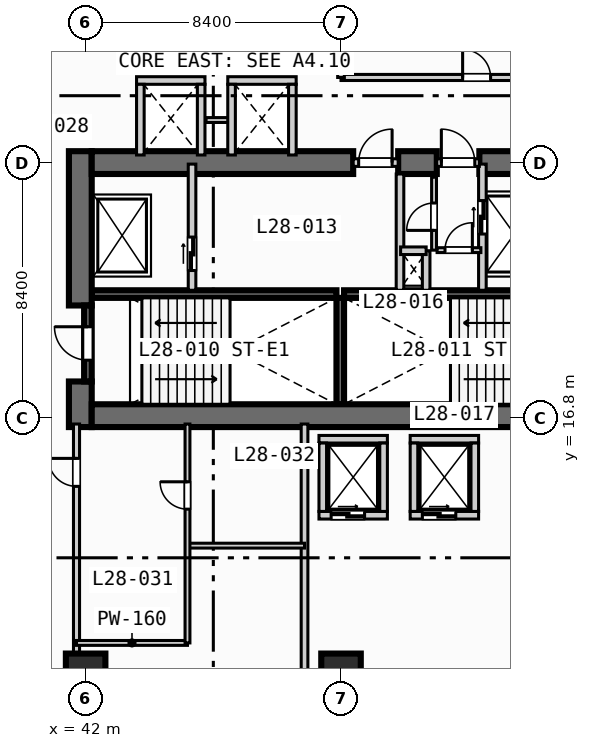
"""IFC4 building model, lengths in metres.
Left out: names, types, materials, properties, quantities, classifications, styles, units other than length and angle.
Written with IfcOpenShell. Run it as: python <this file> out.ifc"""

import sys

from ifc_helpers import new_model, si_unit, direction, frame, frame_2d, origin, origin_2d, place, context, subcontext, project, spatial, rectangle, extrude, element, fill, save


model = new_model("IFC4")
c1 = context("Model", 3, precision=1e-05, world=origin(), true_north=direction((0.0, 1.0)))
c2 = subcontext(c1, "Body", "Model", "MODEL_VIEW")
j1 = project(units=[si_unit("LENGTHUNIT", "METRE"), si_unit("PLANEANGLEUNIT", "RADIAN")], contexts=[c1])
p1 = place(None, origin())
s1 = spatial("IfcSite", under=j1, at=p1, CompositionType="ELEMENT")
p2 = place(p1, origin())
s2 = spatial("IfcBuilding", under=s1, at=p2, CompositionType="ELEMENT")
p3 = place(p2, frame((0.0, 0.0, 119.0)))
s3 = spatial("IfcBuildingStorey", under=s2, at=p3, CompositionType="ELEMENT", Elevation=119.0)
for number, where, z_axis, x_axis in (
    (1, (42.2, 20.875, 0.0), (0.0, 0.0, 1.0), (1.0, 0.0, 0.0)),
    (2, (50.5, 20.875, 0.0), (0.0, 0.0, 1.0), (1.0, 0.0, 0.0)),
):
    element("IfcWall", number, at=place(p3, frame(where, z_axis=z_axis, x_axis=x_axis)), inside=s3, PredefinedType="SOLIDWALL", context=c2, shape_type="SweptSolid", body=[
        extrude(rectangle(XDim=8.05, YDim=0.25, at=frame_2d((4.025, 0.0))), origin(), (0.0, 0.0, 1.0), 3.55),
    ])
p4 = place(p3, frame((50.375, 17.25, 0.0), z_axis=(0.0, 0.0, 1.0), x_axis=(0.0, 1.0, 0.0)))
e3 = element("IfcWall", 3, at=p4, inside=s3, PredefinedType="SOLIDWALL", context=c2, shape_type="SweptSolid", body=[
    extrude(rectangle(XDim=3.5, YDim=0.25, at=frame_2d((1.75, 0.0))), origin(), (0.0, 0.0, 1.0), 3.55),
])
p5 = place(p3, frame((41.825, 16.5, 0.0), z_axis=(0.0, 0.0, 1.0), x_axis=(0.0, 1.0, 0.0)))
e4 = element("IfcWall", 4, at=p5, inside=s3, PredefinedType="SHEAR", context=c2, shape_type="SweptSolid", body=[
    extrude(rectangle(XDim=1.5, YDim=0.75, at=frame_2d((0.75, 0.0))), origin(), (0.0, 0.0, 1.0), 3.55),
])
p6 = place(p3, frame((41.825, 20.5, 0.0), z_axis=(0.0, 0.0, 1.0), x_axis=(0.0, 1.0, 0.0)))
e5 = element("IfcWall", 5, at=p6, inside=s3, PredefinedType="SHEAR", context=c2, shape_type="SweptSolid", body=[
    extrude(rectangle(XDim=5.075, YDim=0.75, at=frame_2d((2.538, 0.0))), origin(), (0.0, 0.0, 1.0), 3.55),
])
p7 = place(p3, frame((42.2, 16.875, 0.0), z_axis=(0.0, 0.0, 1.0), x_axis=(1.0, 0.0, 0.0)))
e6 = element("IfcWall", 6, at=p7, inside=s3, PredefinedType="SHEAR", context=c2, shape_type="SweptSolid", body=[
    extrude(rectangle(XDim=16.35, YDim=0.75, at=frame_2d((8.175, 0.0))), origin(), (0.0, 0.0, 1.0), 3.55),
])
p8 = place(p3, frame((42.2, 25.2, 0.0), z_axis=(0.0, 0.0, 1.0), x_axis=(1.0, 0.0, 0.0)))
e7 = element("IfcWall", 7, at=p8, inside=s3, PredefinedType="SHEAR", context=c2, shape_type="SweptSolid", body=[
    extrude(rectangle(XDim=8.6, YDim=0.75, at=frame_2d((4.3, 0.0))), origin(), (0.0, 0.0, 1.0), 3.55),
])
p9 = place(p3, frame((52.28, 25.2, 0.0), z_axis=(0.0, 0.0, 1.0), x_axis=(1.0, 0.0, 0.0)))
e8 = element("IfcWall", 8, at=p9, inside=s3, PredefinedType="SHEAR", context=c2, shape_type="SweptSolid", body=[
    extrude(rectangle(XDim=1.27, YDim=0.75, at=frame_2d((0.635, 0.0))), origin(), (0.0, 0.0, 1.0), 3.55),
])
p10 = place(p3, frame((54.95, 25.2, 0.0), z_axis=(0.0, 0.0, 1.0), x_axis=(1.0, 0.0, 0.0)))
e9 = element("IfcWall", 9, at=p10, inside=s3, PredefinedType="SHEAR", context=c2, shape_type="SweptSolid", body=[
    extrude(rectangle(XDim=3.6, YDim=0.75, at=frame_2d((1.8, 0.0))), origin(), (0.0, 0.0, 1.0), 3.55),
])
for number, where, z_axis, x_axis in (
    (10, (42.0, 8.4, 0.0), (0.0, 0.0, 1.0), (1.0, 0.0, 0.0)),
    (11, (50.4, 8.4, 0.0), (0.0, 0.0, 1.0), (1.0, 0.0, 0.0)),
):
    element("IfcColumn", number, at=place(p3, frame(where, z_axis=z_axis, x_axis=x_axis)), inside=s3, PredefinedType="COLUMN", context=c2, shape_type="SweptSolid", body=[
        extrude(rectangle(XDim=1.3, YDim=1.3, at=origin_2d()), origin(), (0.0, 0.0, 1.0), 3.8),
    ])
p11 = place(p3, frame((42.075, 18.0, 0.0), z_axis=(0.0, 0.0, 1.0), x_axis=(0.0, 1.0, 0.0)))
e12 = element("IfcWall", 12, at=p11, inside=s3, PredefinedType="SOLIDWALL", context=c2, shape_type="SweptSolid", body=[
    extrude(rectangle(XDim=2.5, YDim=0.25, at=frame_2d((1.25, 0.0))), origin(), (0.0, 0.0, 1.0), 3.55),
])
p12 = place(p11, frame((0.7, 0.0, 0.0)))
e13 = element("IfcOpeningElement", 13, at=p12, cuts=e12, PredefinedType="OPENING", context=c2, shape_type="SweptSolid", body=[
    extrude(rectangle(XDim=1.1, YDim=2.15, at=frame_2d((0.55, 1.075))), frame((0.0, 0.135, 0.0), z_axis=(0.0, -1.0, 0.0), x_axis=(1.0, 0.0, 0.0)), (0.0, 0.0, 1.0), 0.27),
])
p13 = place(p3, frame((45.5, 21.0, 0.0), z_axis=(0.0, 0.0, 1.0), x_axis=(0.0, 1.0, 0.0)))
e14 = element("IfcWall", 14, at=p13, inside=s3, PredefinedType="SOLIDWALL", context=c2, shape_type="SweptSolid", body=[
    extrude(rectangle(XDim=4.15, YDim=0.25, at=frame_2d((2.075, 0.0))), origin(), (0.0, 0.0, 1.0), 3.55),
])
p14 = place(p13, frame((0.65, 0.0, 0.0)))
e15 = element("IfcOpeningElement", 15, at=p14, cuts=e14, PredefinedType="OPENING", context=c2, shape_type="SweptSolid", body=[
    extrude(rectangle(XDim=1.1, YDim=2.15, at=frame_2d((0.55, 1.075))), frame((0.0, 0.135, 0.0), z_axis=(0.0, -1.0, 0.0), x_axis=(1.0, 0.0, 0.0)), (0.0, 0.0, 1.0), 0.27),
])
p15 = place(p3, frame((50.8, 25.2, 0.0), z_axis=(0.0, 0.0, 1.0), x_axis=(1.0, 0.0, 0.0)))
e16 = element("IfcWall", 16, at=p15, inside=s3, PredefinedType="SOLIDWALL", context=c2, shape_type="SweptSolid", body=[
    extrude(rectangle(XDim=1.48, YDim=0.25, at=frame_2d((0.74, 0.0))), origin(), (0.0, 0.0, 1.0), 3.55),
])
p16 = place(p15, frame((0.18, 0.0, 0.0)))
e17 = element("IfcOpeningElement", 17, at=p16, cuts=e16, PredefinedType="OPENING", context=c2, shape_type="SweptSolid", body=[
    extrude(rectangle(XDim=1.1, YDim=2.15, at=frame_2d((0.55, 1.075))), frame((0.0, 0.135, 0.0), z_axis=(0.0, -1.0, 0.0), x_axis=(1.0, 0.0, 0.0)), (0.0, 0.0, 1.0), 0.27),
])
p17 = place(p3, frame((52.34, 21.0, 0.0), z_axis=(0.0, 0.0, 1.0), x_axis=(0.0, 1.0, 0.0)))
e18 = element("IfcWall", 18, at=p17, inside=s3, PredefinedType="SOLIDWALL", context=c2, shape_type="SweptSolid", body=[
    extrude(rectangle(XDim=3.825, YDim=0.25, at=frame_2d((1.913, 0.0))), origin(), (0.0, 0.0, 1.0), 3.55),
])
p18 = place(p3, frame((55.05, 21.0, 0.0), z_axis=(0.0, 0.0, 1.0), x_axis=(0.0, 1.0, 0.0)))
e19 = element("IfcWall", 19, at=p18, inside=s3, PredefinedType="SOLIDWALL", context=c2, shape_type="SweptSolid", body=[
    extrude(rectangle(XDim=4.15, YDim=0.25, at=frame_2d((2.075, 0.0))), origin(), (0.0, 0.0, 1.0), 3.55),
])
p19 = place(p18, frame((1.85, 0.0, 0.0)))
e20 = element("IfcOpeningElement", 20, at=p19, cuts=e19, PredefinedType="OPENING", context=c2, shape_type="SweptSolid", body=[
    extrude(rectangle(XDim=1.1, YDim=2.15, at=frame_2d((0.55, 1.075))), frame((0.0, 0.135, 0.0), z_axis=(0.0, -1.0, 0.0), x_axis=(1.0, 0.0, 0.0)), (0.0, 0.0, 1.0), 0.27),
])
p20 = place(p3, frame((53.55, 25.2, 0.0), z_axis=(0.0, 0.0, 1.0), x_axis=(1.0, 0.0, 0.0)))
e21 = element("IfcWall", 21, at=p20, inside=s3, PredefinedType="SOLIDWALL", context=c2, shape_type="SweptSolid", body=[
    extrude(rectangle(XDim=1.4, YDim=0.25, at=frame_2d((0.7, 0.0))), origin(), (0.0, 0.0, 1.0), 3.55),
])
p21 = place(p20, frame((0.15, 0.0, 0.0)))
e22 = element("IfcOpeningElement", 22, at=p21, cuts=e21, PredefinedType="OPENING", context=c2, shape_type="SweptSolid", body=[
    extrude(rectangle(XDim=1.1, YDim=2.15, at=frame_2d((0.55, 1.075))), frame((0.0, 0.135, 0.0), z_axis=(0.0, -1.0, 0.0), x_axis=(1.0, 0.0, 0.0)), (0.0, 0.0, 1.0), 0.27),
])
p22 = place(p3, frame((53.2, 21.0, 0.0), z_axis=(0.0, 0.0, 1.0), x_axis=(0.0, 1.0, 0.0)))
e23 = element("IfcWall", 23, at=p22, inside=s3, PredefinedType="SOLIDWALL", context=c2, shape_type="SweptSolid", body=[
    extrude(rectangle(XDim=1.3, YDim=0.25, at=frame_2d((0.65, 0.0))), origin(), (0.0, 0.0, 1.0), 3.55),
])
p23 = place(p3, frame((52.36, 22.3, 0.0), z_axis=(0.0, 0.0, 1.0), x_axis=(1.0, 0.0, 0.0)))
e24 = element("IfcWall", 24, at=p23, inside=s3, PredefinedType="SOLIDWALL", context=c2, shape_type="SweptSolid", body=[
    extrude(rectangle(XDim=0.84, YDim=0.25, at=frame_2d((0.42, 0.0))), origin(), (0.0, 0.0, 1.0), 3.55),
])
p24 = place(p3, frame((53.56, 22.32, 0.0), z_axis=(0.0, 0.0, 1.0), x_axis=(1.0, 0.0, 0.0)))
e25 = element("IfcWall", 25, at=p24, inside=s3, PredefinedType="PARTITIONING", context=c2, shape_type="SweptSolid", body=[
    extrude(rectangle(XDim=1.44, YDim=0.16, at=frame_2d((0.72, 0.0))), origin(), (0.0, 0.0, 1.0), 3.55),
])
p25 = place(p24, frame((0.26, 0.0, 0.0)))
e26 = element("IfcOpeningElement", 26, at=p25, cuts=e25, PredefinedType="OPENING", context=c2, shape_type="SweptSolid", body=[
    extrude(rectangle(XDim=0.9, YDim=2.1, at=frame_2d((0.45, 1.05))), frame((0.0, 0.09, 0.0), z_axis=(0.0, -1.0, 0.0), x_axis=(1.0, 0.0, 0.0)), (0.0, 0.0, 1.0), 0.18),
])
p26 = place(p3, frame((53.46, 22.32, 0.0), z_axis=(0.0, 0.0, 1.0), x_axis=(0.0, 1.0, 0.0)))
e27 = element("IfcWall", 27, at=p26, inside=s3, PredefinedType="PARTITIONING", context=c2, shape_type="SweptSolid", body=[
    extrude(rectangle(XDim=2.4, YDim=0.16, at=frame_2d((1.2, 0.0))), origin(), (0.0, 0.0, 1.0), 3.55),
])
p27 = place(p26, frame((0.65, 0.0, 0.0)))
e28 = element("IfcOpeningElement", 28, at=p27, cuts=e27, PredefinedType="OPENING", context=c2, shape_type="SweptSolid", body=[
    extrude(rectangle(XDim=0.9, YDim=2.1, at=frame_2d((0.45, 1.05))), frame((0.0, 0.09, 0.0), z_axis=(0.0, -1.0, 0.0), x_axis=(1.0, 0.0, 0.0)), (0.0, 0.0, 1.0), 0.18),
])
p28 = place(p3, frame((49.675, 13.6, 0.0), z_axis=(0.0, 0.0, 1.0), x_axis=(1.0, 0.0, 0.0)))
e29 = element("IfcWall", 29, at=p28, inside=s3, PredefinedType="SOLIDWALL", context=c2, shape_type="SweptSolid", body=[
    extrude(rectangle(XDim=2.25, YDim=0.25, at=frame_2d((1.125, 0.0))), origin(), (0.0, 0.0, 1.0), 3.55),
])
p29 = place(p28, frame((0.4, 0.0, 0.0)))
e30 = element("IfcOpeningElement", 30, at=p29, cuts=e29, PredefinedType="OPENING", context=c2, shape_type="SweptSolid", body=[
    extrude(rectangle(XDim=1.1, YDim=2.15, at=frame_2d((0.55, 1.075))), frame((0.0, 0.135, 0.0), z_axis=(0.0, -1.0, 0.0), x_axis=(1.0, 0.0, 0.0)), (0.0, 0.0, 1.0), 0.27),
])
for number, where, z_axis, x_axis in (
    (31, (49.675, 16.1, 0.0), (0.0, 0.0, 1.0), (1.0, 0.0, 0.0)),
    (32, (49.8, 13.725, 0.0), (0.0, 0.0, 1.0), (0.0, 1.0, 0.0)),
    (33, (51.8, 13.725, 0.0), (0.0, 0.0, 1.0), (0.0, 1.0, 0.0)),
):
    element("IfcWall", number, at=place(p3, frame(where, z_axis=z_axis, x_axis=x_axis)), inside=s3, PredefinedType="SOLIDWALL", context=c2, shape_type="SweptSolid", body=[
        extrude(rectangle(XDim=2.25, YDim=0.25, at=frame_2d((1.125, 0.0))), origin(), (0.0, 0.0, 1.0), 3.55),
    ])
p30 = place(p3, frame((52.675, 13.6, 0.0), z_axis=(0.0, 0.0, 1.0), x_axis=(1.0, 0.0, 0.0)))
e34 = element("IfcWall", 34, at=p30, inside=s3, PredefinedType="SOLIDWALL", context=c2, shape_type="SweptSolid", body=[
    extrude(rectangle(XDim=2.25, YDim=0.25, at=frame_2d((1.125, 0.0))), origin(), (0.0, 0.0, 1.0), 3.55),
])
p31 = place(p30, frame((0.4, 0.0, 0.0)))
e35 = element("IfcOpeningElement", 35, at=p31, cuts=e34, PredefinedType="OPENING", context=c2, shape_type="SweptSolid", body=[
    extrude(rectangle(XDim=1.1, YDim=2.15, at=frame_2d((0.55, 1.075))), frame((0.0, 0.135, 0.0), z_axis=(0.0, -1.0, 0.0), x_axis=(1.0, 0.0, 0.0)), (0.0, 0.0, 1.0), 0.27),
])
for number, where, z_axis, x_axis in (
    (36, (52.675, 16.1, 0.0), (0.0, 0.0, 1.0), (1.0, 0.0, 0.0)),
    (37, (52.8, 13.725, 0.0), (0.0, 0.0, 1.0), (0.0, 1.0, 0.0)),
    (38, (54.8, 13.725, 0.0), (0.0, 0.0, 1.0), (0.0, 1.0, 0.0)),
    (39, (43.675, 27.9, 0.0), (0.0, 0.0, 1.0), (1.0, 0.0, 0.0)),
):
    element("IfcWall", number, at=place(p3, frame(where, z_axis=z_axis, x_axis=x_axis)), inside=s3, PredefinedType="SOLIDWALL", context=c2, shape_type="SweptSolid", body=[
        extrude(rectangle(XDim=2.25, YDim=0.25, at=frame_2d((1.125, 0.0))), origin(), (0.0, 0.0, 1.0), 3.55),
    ])
for number, where, z_axis, x_axis in (
    (40, (43.8, 25.45, 0.0), (0.0, 0.0, 1.0), (0.0, 1.0, 0.0)),
    (41, (45.8, 25.45, 0.0), (0.0, 0.0, 1.0), (0.0, 1.0, 0.0)),
):
    element("IfcWall", number, at=place(p3, frame(where, z_axis=z_axis, x_axis=x_axis)), inside=s3, PredefinedType="SOLIDWALL", context=c2, shape_type="SweptSolid", body=[
        extrude(rectangle(XDim=2.325, YDim=0.25, at=frame_2d((1.163, 0.0))), origin(), (0.0, 0.0, 1.0), 3.55),
    ])
p32 = place(p3, frame((45.96, 26.6, 0.0), z_axis=(0.0, 0.0, 1.0), x_axis=(1.0, 0.0, 0.0)))
e42 = element("IfcWall", 42, at=p32, inside=s3, PredefinedType="PARTITIONING", context=c2, shape_type="SweptSolid", body=[
    extrude(rectangle(XDim=0.88, YDim=0.16, at=frame_2d((0.44, 0.0))), origin(), (0.0, 0.0, 1.0), 3.55),
])
p33 = place(p3, frame((46.675, 27.9, 0.0), z_axis=(0.0, 0.0, 1.0), x_axis=(1.0, 0.0, 0.0)))
e43 = element("IfcWall", 43, at=p33, inside=s3, PredefinedType="SOLIDWALL", context=c2, shape_type="SweptSolid", body=[
    extrude(rectangle(XDim=2.25, YDim=0.25, at=frame_2d((1.125, 0.0))), origin(), (0.0, 0.0, 1.0), 3.55),
])
for number, where, z_axis, x_axis in (
    (44, (46.8, 25.45, 0.0), (0.0, 0.0, 1.0), (0.0, 1.0, 0.0)),
    (45, (48.8, 25.45, 0.0), (0.0, 0.0, 1.0), (0.0, 1.0, 0.0)),
):
    element("IfcWall", number, at=place(p3, frame(where, z_axis=z_axis, x_axis=x_axis)), inside=s3, PredefinedType="SOLIDWALL", context=c2, shape_type="SweptSolid", body=[
        extrude(rectangle(XDim=2.325, YDim=0.25, at=frame_2d((1.163, 0.0))), origin(), (0.0, 0.0, 1.0), 3.55),
    ])
p34 = place(p3, frame((41.7, 0.35, 0.0), z_axis=(0.0, 0.0, 1.0), x_axis=(0.0, 1.0, 0.0)))
e46 = element("IfcWall", 46, at=p34, inside=s3, PredefinedType="PARTITIONING", context=c2, shape_type="SweptSolid", body=[
    extrude(rectangle(XDim=16.25, YDim=0.2, at=frame_2d((8.125, 0.0))), origin(), (0.0, 0.0, 1.0), 2.8),
])
p35 = place(p34, frame((4.0, 0.0, 0.0)))
e47 = element("IfcOpeningElement", 47, at=p35, cuts=e46, PredefinedType="OPENING", context=c2, shape_type="SweptSolid", body=[
    extrude(rectangle(XDim=0.92, YDim=2.1, at=frame_2d((0.46, 1.05))), frame((0.0, 0.11, 0.0), z_axis=(0.0, -1.0, 0.0), x_axis=(1.0, 0.0, 0.0)), (0.0, 0.0, 1.0), 0.22),
])
p36 = place(p34, frame((14.2, 0.0, 0.0)))
e48 = element("IfcOpeningElement", 48, at=p36, cuts=e46, PredefinedType="OPENING", context=c2, shape_type="SweptSolid", body=[
    extrude(rectangle(XDim=0.92, YDim=2.1, at=frame_2d((0.46, 1.05))), frame((0.0, 0.11, 0.0), z_axis=(0.0, -1.0, 0.0), x_axis=(1.0, 0.0, 0.0)), (0.0, 0.0, 1.0), 0.22),
])
p37 = place(p3, frame((49.2, 0.35, 0.0), z_axis=(0.0, 0.0, 1.0), x_axis=(0.0, 1.0, 0.0)))
e49 = element("IfcWall", 49, at=p37, inside=s3, PredefinedType="PARTITIONING", context=c2, shape_type="SweptSolid", body=[
    extrude(rectangle(XDim=16.25, YDim=0.22, at=frame_2d((8.125, 0.0))), origin(), (0.0, 0.0, 1.0), 3.55),
])
p38 = place(p3, frame((41.7, 9.4, 0.0), z_axis=(0.0, 0.0, 1.0), x_axis=(1.0, 0.0, 0.0)))
e50 = element("IfcWall", 50, at=p38, inside=s3, PredefinedType="PARTITIONING", context=c2, shape_type="SweptSolid", body=[
    extrude(rectangle(XDim=3.65, YDim=0.16, at=frame_2d((1.825, 0.0))), origin(), (0.0, 0.0, 1.0), 3.55),
])
p39 = place(p3, frame((45.35, 12.6, 0.0), z_axis=(0.0, 0.0, 1.0), x_axis=(1.0, 0.0, 0.0)))
e51 = element("IfcWall", 51, at=p39, inside=s3, PredefinedType="PARTITIONING", context=c2, shape_type="SweptSolid", body=[
    extrude(rectangle(XDim=3.85, YDim=0.16, at=frame_2d((1.925, 0.0))), origin(), (0.0, 0.0, 1.0), 3.55),
])
p40 = place(p3, frame((45.35, 9.4, 0.0), z_axis=(0.0, 0.0, 1.0), x_axis=(0.0, 1.0, 0.0)))
e52 = element("IfcWall", 52, at=p40, inside=s3, PredefinedType="PARTITIONING", context=c2, shape_type="SweptSolid", body=[
    extrude(rectangle(XDim=7.2, YDim=0.16, at=frame_2d((3.6, 0.0))), origin(), (0.0, 0.0, 1.0), 3.55),
])
p41 = place(p40, frame((4.4, 0.0, 0.0)))
e53 = element("IfcOpeningElement", 53, at=p41, cuts=e52, PredefinedType="OPENING", context=c2, shape_type="SweptSolid", body=[
    extrude(rectangle(XDim=0.9, YDim=2.1, at=frame_2d((0.45, 1.05))), frame((0.0, 0.09, 0.0), z_axis=(0.0, -1.0, 0.0), x_axis=(1.0, 0.0, 0.0)), (0.0, 0.0, 1.0), 0.18),
])
p42 = place(p3, frame((50.4, 28.0, 0.0), z_axis=(0.0, 0.0, 1.0), x_axis=(1.0, 0.0, 0.0)))
e54 = element("IfcWall", 54, at=p42, inside=s3, PredefinedType="PARTITIONING", context=c2, shape_type="SweptSolid", body=[
    extrude(rectangle(XDim=21.8, YDim=0.2, at=frame_2d((10.9, 0.0))), origin(), (0.0, 0.0, 1.0), 3.55),
])
p43 = place(p42, frame((4.0, 0.0, 0.0)))
e55 = element("IfcOpeningElement", 55, at=p43, cuts=e54, PredefinedType="OPENING", context=c2, shape_type="SweptSolid", body=[
    extrude(rectangle(XDim=0.92, YDim=2.1, at=frame_2d((0.46, 1.05))), frame((0.0, 0.11, 0.0), z_axis=(0.0, -1.0, 0.0), x_axis=(1.0, 0.0, 0.0)), (0.0, 0.0, 1.0), 0.22),
])
p44 = place(p3, frame((50.4, 28.0, 0.0), z_axis=(0.0, 0.0, 1.0), x_axis=(0.0, 1.0, 0.0)))
e56 = element("IfcWall", 56, at=p44, inside=s3, PredefinedType="PARTITIONING", context=c2, shape_type="SweptSolid", body=[
    extrude(rectangle(XDim=5.3, YDim=0.22, at=frame_2d((2.65, 0.0))), origin(), (0.0, 0.0, 1.0), 2.8),
])
p45 = place(p12, origin())
e57 = element("IfcDoor", 57, at=p45, inside=s3, OperationType="SINGLE_SWING_RIGHT", PredefinedType="DOOR", context=c2, shape_type="SweptSolid", body=[
    extrude(rectangle(XDim=1.1, YDim=2.15, at=frame_2d((0.55, 1.075))), frame((0.0, 0.025, 0.0), z_axis=(0.0, -1.0, 0.0), x_axis=(1.0, 0.0, 0.0)), (0.0, 0.0, 1.0), 0.05),
])
fill(e13, e57)
p46 = place(p14, origin())
e58 = element("IfcDoor", 58, at=p46, inside=s3, OperationType="SLIDING_TO_LEFT", PredefinedType="DOOR", context=c2, shape_type="SweptSolid", body=[
    extrude(rectangle(XDim=1.1, YDim=2.15, at=frame_2d((0.55, 1.075))), frame((0.0, 0.025, 0.0), z_axis=(0.0, -1.0, 0.0), x_axis=(1.0, 0.0, 0.0)), (0.0, 0.0, 1.0), 0.05),
])
fill(e15, e58)
p47 = place(p16, origin())
e59 = element("IfcDoor", 59, at=p47, inside=s3, OperationType="SINGLE_SWING_RIGHT", PredefinedType="DOOR", context=c2, shape_type="SweptSolid", body=[
    extrude(rectangle(XDim=1.1, YDim=2.15, at=frame_2d((0.55, 1.075))), frame((0.0, 0.025, 0.0), z_axis=(0.0, -1.0, 0.0), x_axis=(1.0, 0.0, 0.0)), (0.0, 0.0, 1.0), 0.05),
])
fill(e17, e59)
p48 = place(p19, origin())
e60 = element("IfcDoor", 60, at=p48, inside=s3, OperationType="SLIDING_TO_LEFT", PredefinedType="DOOR", context=c2, shape_type="SweptSolid", body=[
    extrude(rectangle(XDim=1.1, YDim=2.15, at=frame_2d((0.55, 1.075))), frame((0.0, 0.025, 0.0), z_axis=(0.0, -1.0, 0.0), x_axis=(1.0, 0.0, 0.0)), (0.0, 0.0, 1.0), 0.05),
])
fill(e20, e60)
p49 = place(p21, origin())
e61 = element("IfcDoor", 61, at=p49, inside=s3, OperationType="SINGLE_SWING_LEFT", PredefinedType="DOOR", context=c2, shape_type="SweptSolid", body=[
    extrude(rectangle(XDim=1.1, YDim=2.15, at=frame_2d((0.55, 1.075))), frame((0.0, 0.025, 0.0), z_axis=(0.0, -1.0, 0.0), x_axis=(1.0, 0.0, 0.0)), (0.0, 0.0, 1.0), 0.05),
])
fill(e22, e61)
p50 = place(p25, origin())
e62 = element("IfcDoor", 62, at=p50, inside=s3, OperationType="SINGLE_SWING_RIGHT", PredefinedType="DOOR", context=c2, shape_type="SweptSolid", body=[
    extrude(rectangle(XDim=0.9, YDim=2.1, at=frame_2d((0.45, 1.05))), frame((0.0, 0.025, 0.0), z_axis=(0.0, -1.0, 0.0), x_axis=(1.0, 0.0, 0.0)), (0.0, 0.0, 1.0), 0.05),
])
fill(e26, e62)
p51 = place(p27, origin())
e63 = element("IfcDoor", 63, at=p51, inside=s3, OperationType="SINGLE_SWING_LEFT", PredefinedType="DOOR", context=c2, shape_type="SweptSolid", body=[
    extrude(rectangle(XDim=0.9, YDim=2.1, at=frame_2d((0.45, 1.05))), frame((0.0, 0.025, 0.0), z_axis=(0.0, -1.0, 0.0), x_axis=(1.0, 0.0, 0.0)), (0.0, 0.0, 1.0), 0.05),
])
fill(e28, e63)
p52 = place(p29, origin())
e64 = element("IfcDoor", 64, at=p52, inside=s3, OperationType="SLIDING_TO_LEFT", PredefinedType="DOOR", context=c2, shape_type="SweptSolid", body=[
    extrude(rectangle(XDim=1.1, YDim=2.15, at=frame_2d((0.55, 1.075))), frame((0.0, 0.025, 0.0), z_axis=(0.0, -1.0, 0.0), x_axis=(1.0, 0.0, 0.0)), (0.0, 0.0, 1.0), 0.05),
])
fill(e30, e64)
p53 = place(p31, origin())
e65 = element("IfcDoor", 65, at=p53, inside=s3, OperationType="SLIDING_TO_LEFT", PredefinedType="DOOR", context=c2, shape_type="SweptSolid", body=[
    extrude(rectangle(XDim=1.1, YDim=2.15, at=frame_2d((0.55, 1.075))), frame((0.0, 0.025, 0.0), z_axis=(0.0, -1.0, 0.0), x_axis=(1.0, 0.0, 0.0)), (0.0, 0.0, 1.0), 0.05),
])
fill(e35, e65)
p54 = place(p36, origin())
e66 = element("IfcDoor", 66, at=p54, inside=s3, OperationType="SINGLE_SWING_RIGHT", PredefinedType="DOOR", context=c2, shape_type="SweptSolid", body=[
    extrude(rectangle(XDim=0.92, YDim=2.1, at=frame_2d((0.46, 1.05))), frame((0.0, 0.025, 0.0), z_axis=(0.0, -1.0, 0.0), x_axis=(1.0, 0.0, 0.0)), (0.0, 0.0, 1.0), 0.05),
])
fill(e48, e66)
p55 = place(p41, origin())
e67 = element("IfcDoor", 67, at=p55, inside=s3, OperationType="SINGLE_SWING_RIGHT", PredefinedType="DOOR", context=c2, shape_type="SweptSolid", body=[
    extrude(rectangle(XDim=0.9, YDim=2.1, at=frame_2d((0.45, 1.05))), frame((0.0, 0.025, 0.0), z_axis=(0.0, -1.0, 0.0), x_axis=(1.0, 0.0, 0.0)), (0.0, 0.0, 1.0), 0.05),
])
fill(e53, e67)
p56 = place(p43, origin())
e68 = element("IfcDoor", 68, at=p56, inside=s3, OperationType="SINGLE_SWING_LEFT", PredefinedType="DOOR", context=c2, shape_type="SweptSolid", body=[
    extrude(rectangle(XDim=0.92, YDim=2.1, at=frame_2d((0.46, 1.05))), frame((0.0, 0.025, 0.0), z_axis=(0.0, -1.0, 0.0), x_axis=(1.0, 0.0, 0.0)), (0.0, 0.0, 1.0), 0.05),
])
fill(e55, e68)
save(model, sys.argv[1])
